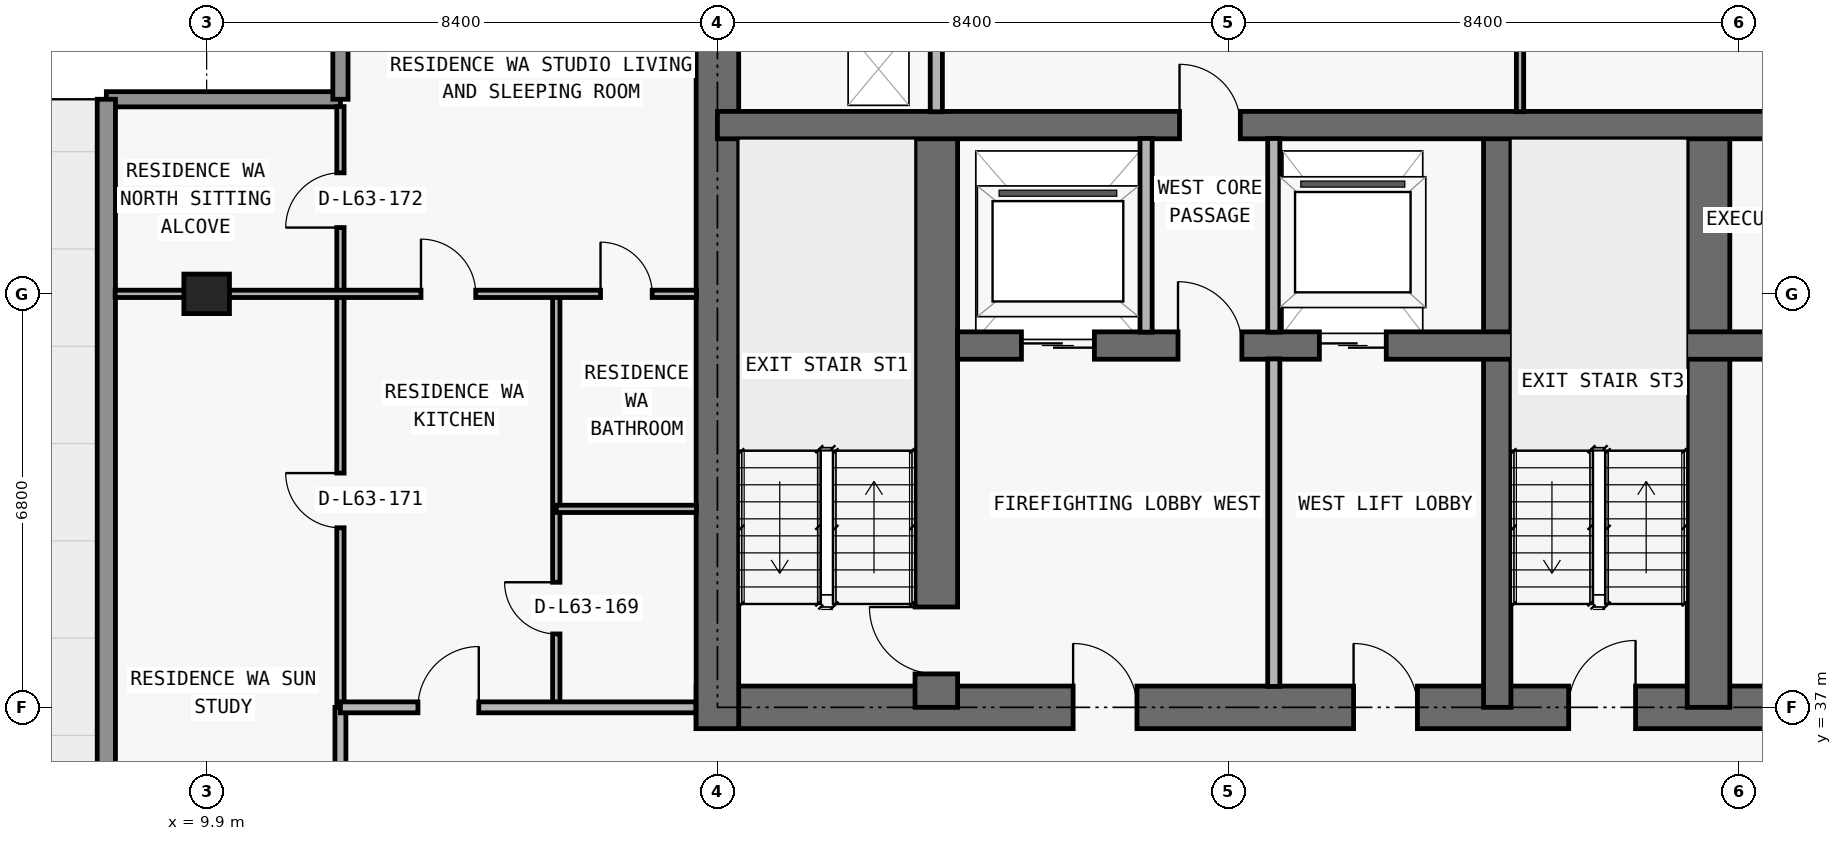
"""IFC4 building model, lengths in metres.
Left out: names, types, materials, properties, quantities, classifications, styles, units other than length and angle.
Written with IfcOpenShell. Run it as: python <this file> out.ifc"""

import sys

from ifc_helpers import new_model, si_unit, direction, frame, frame_2d, origin, origin_2d, place, context, subcontext, project, spatial, rectangle, extrude, element, fill, save


model = new_model("IFC4")
c1 = context("Model", 3, precision=1e-05, world=origin(), true_north=direction((0.0, 1.0)))
c2 = subcontext(c1, "Body", "Model", "MODEL_VIEW")
j1 = project(units=[si_unit("LENGTHUNIT", "METRE"), si_unit("PLANEANGLEUNIT", "RADIAN")], contexts=[c1])
p1 = place(None, origin())
s1 = spatial("IfcSite", under=j1, at=p1, CompositionType="ELEMENT")
p2 = place(p1, origin())
s2 = spatial("IfcBuilding", under=s1, at=p2, CompositionType="ELEMENT")
p3 = place(p2, frame((0.0, 0.0, 226.5)))
s3 = spatial("IfcBuildingStorey", under=s2, at=p3, CompositionType="ELEMENT", Elevation=226.5)
p4 = place(p3, frame((9.9, 43.8, 0.0), z_axis=(0.0, 0.0, 1.0), x_axis=(1.0, 0.0, 0.0)))
e1 = element("IfcColumn", 1, at=p4, inside=s3, PredefinedType="COLUMN", context=c2, shape_type="SweptSolid", body=[
    extrude(rectangle(XDim=0.75, YDim=0.65, at=origin_2d()), origin(), (0.0, 0.0, 1.0), 3.05),
])
p5 = place(p3, frame((17.95, 37.0, 0.0), z_axis=(0.0, 0.0, 1.0), x_axis=(1.0, 0.0, 0.0)))
e2 = element("IfcWall", 2, at=p5, inside=s3, PredefinedType="SHEAR", context=c2, shape_type="SweptSolid", body=[
    extrude(rectangle(XDim=41.9, YDim=0.7, at=frame_2d((20.95, 0.0))), origin(), (0.0, 0.0, 1.0), 3.05),
])
p6 = place(p5, frame((14.35, 0.0, 0.0)))
e3 = element("IfcOpeningElement", 3, at=p6, cuts=e2, PredefinedType="OPENING", context=c2, shape_type="SweptSolid", body=[
    extrude(rectangle(XDim=1.1, YDim=2.15, at=frame_2d((0.55, 1.075))), frame((0.0, 0.36, 0.0), z_axis=(0.0, -1.0, 0.0), x_axis=(1.0, 0.0, 0.0)), (0.0, 0.0, 1.0), 0.72),
])
p7 = place(p5, frame((6.2, 0.0, 0.0)))
e4 = element("IfcOpeningElement", 4, at=p7, cuts=e2, PredefinedType="OPENING", context=c2, shape_type="SweptSolid", body=[
    extrude(rectangle(XDim=1.05, YDim=2.15, at=frame_2d((0.525, 1.075))), frame((0.0, 0.36, 0.0), z_axis=(0.0, -1.0, 0.0), x_axis=(1.0, 0.0, 0.0)), (0.0, 0.0, 1.0), 0.72),
])
p8 = place(p5, frame((34.7, 0.0, 0.0)))
e5 = element("IfcOpeningElement", 5, at=p8, cuts=e2, PredefinedType="OPENING", context=c2, shape_type="SweptSolid", body=[
    extrude(rectangle(XDim=1.05, YDim=2.15, at=frame_2d((0.525, 1.075))), frame((0.0, 0.36, 0.0), z_axis=(0.0, -1.0, 0.0), x_axis=(1.0, 0.0, 0.0)), (0.0, 0.0, 1.0), 0.72),
])
p9 = place(p5, frame((10.812, 0.0, 0.0)))
e6 = element("IfcOpeningElement", 6, at=p9, cuts=e2, PredefinedType="OPENING", context=c2, shape_type="SweptSolid", body=[
    extrude(rectangle(XDim=1.05, YDim=2.15, at=frame_2d((0.525, 1.075))), frame((0.0, 0.36, 0.0), z_axis=(0.0, -1.0, 0.0), x_axis=(1.0, 0.0, 0.0)), (0.0, 0.0, 1.0), 0.72),
])
p10 = place(p5, frame((24.05, 0.0, 0.0)))
e7 = element("IfcOpeningElement", 7, at=p10, cuts=e2, PredefinedType="OPENING", context=c2, shape_type="SweptSolid", body=[
    extrude(rectangle(XDim=1.05, YDim=2.15, at=frame_2d((0.525, 1.075))), frame((0.0, 0.36, 0.0), z_axis=(0.0, -1.0, 0.0), x_axis=(1.0, 0.0, 0.0)), (0.0, 0.0, 1.0), 0.72),
])
p11 = place(p3, frame((18.3, 36.65, 0.0), z_axis=(0.0, 0.0, 1.0), x_axis=(0.0, 1.0, 0.0)))
e8 = element("IfcWall", 8, at=p11, inside=s3, PredefinedType="SHEAR", context=c2, shape_type="SweptSolid", body=[
    extrude(rectangle(XDim=13.95, YDim=0.7, at=frame_2d((6.975, 0.0))), origin(), (0.0, 0.0, 1.0), 3.05),
])
p12 = place(p3, frame((21.9, 37.0, 0.0), z_axis=(0.0, 0.0, 1.0), x_axis=(0.0, 1.0, 0.0)))
e9 = element("IfcWall", 9, at=p12, inside=s3, PredefinedType="SHEAR", context=c2, shape_type="SweptSolid", body=[
    extrude(rectangle(XDim=9.575, YDim=0.7, at=frame_2d((4.788, 0.0))), origin(), (0.0, 0.0, 1.0), 3.05),
])
p13 = place(p12, frame((0.55, 0.0, 0.0)))
e10 = element("IfcOpeningElement", 10, at=p13, cuts=e9, PredefinedType="OPENING", context=c2, shape_type="SweptSolid", body=[
    extrude(rectangle(XDim=1.1, YDim=2.15, at=frame_2d((0.55, 1.075))), frame((0.0, 0.36, 0.0), z_axis=(0.0, -1.0, 0.0), x_axis=(1.0, 0.0, 0.0)), (0.0, 0.0, 1.0), 0.72),
])
p14 = place(p3, frame((31.125, 37.0, 0.0), z_axis=(0.0, 0.0, 1.0), x_axis=(0.0, 1.0, 0.0)))
e11 = element("IfcWall", 11, at=p14, inside=s3, PredefinedType="SHEAR", context=c2, shape_type="SweptSolid", body=[
    extrude(rectangle(XDim=9.575, YDim=0.45, at=frame_2d((4.788, 0.0))), origin(), (0.0, 0.0, 1.0), 3.05),
])
p15 = place(p3, frame((34.6, 37.0, 0.0), z_axis=(0.0, 0.0, 1.0), x_axis=(0.0, 1.0, 0.0)))
e12 = element("IfcWall", 12, at=p15, inside=s3, PredefinedType="SHEAR", context=c2, shape_type="SweptSolid", body=[
    extrude(rectangle(XDim=9.575, YDim=0.7, at=frame_2d((4.788, 0.0))), origin(), (0.0, 0.0, 1.0), 3.05),
])
p16 = place(p3, frame((22.25, 42.95, 0.0), z_axis=(0.0, 0.0, 1.0), x_axis=(1.0, 0.0, 0.0)))
e13 = element("IfcWall", 13, at=p16, inside=s3, PredefinedType="SHEAR", context=c2, shape_type="SweptSolid", body=[
    extrude(rectangle(XDim=33.3, YDim=0.45, at=frame_2d((16.65, 0.0))), origin(), (0.0, 0.0, 1.0), 3.05),
])
p17 = place(p16, frame((1.05, 0.0, 0.0)))
e14 = element("IfcOpeningElement", 14, at=p17, cuts=e13, PredefinedType="OPENING", context=c2, shape_type="SweptSolid", body=[
    extrude(rectangle(XDim=1.2, YDim=2.2, at=frame_2d((0.6, 1.1))), frame((0.0, 0.235, 0.0), z_axis=(0.0, -1.0, 0.0), x_axis=(1.0, 0.0, 0.0)), (0.0, 0.0, 1.0), 0.47),
])
p18 = place(p16, frame((31.05, 0.0, 0.0)))
e15 = element("IfcOpeningElement", 15, at=p18, cuts=e13, PredefinedType="OPENING", context=c2, shape_type="SweptSolid", body=[
    extrude(rectangle(XDim=1.2, YDim=2.2, at=frame_2d((0.6, 1.1))), frame((0.0, 0.235, 0.0), z_axis=(0.0, -1.0, 0.0), x_axis=(1.0, 0.0, 0.0)), (0.0, 0.0, 1.0), 0.47),
])
p19 = place(p16, frame((26.45, 0.0, 0.0)))
e16 = element("IfcOpeningElement", 16, at=p19, cuts=e13, PredefinedType="OPENING", context=c2, shape_type="SweptSolid", body=[
    extrude(rectangle(XDim=1.1, YDim=2.2, at=frame_2d((0.55, 1.1))), frame((0.0, 0.235, 0.0), z_axis=(0.0, -1.0, 0.0), x_axis=(1.0, 0.0, 0.0)), (0.0, 0.0, 1.0), 0.47),
])
p20 = place(p16, frame((5.95, 0.0, 0.0)))
e17 = element("IfcOpeningElement", 17, at=p20, cuts=e13, PredefinedType="OPENING", context=c2, shape_type="SweptSolid", body=[
    extrude(rectangle(XDim=1.1, YDim=2.2, at=frame_2d((0.55, 1.1))), frame((0.0, 0.235, 0.0), z_axis=(0.0, -1.0, 0.0), x_axis=(1.0, 0.0, 0.0)), (0.0, 0.0, 1.0), 0.47),
])
p21 = place(p16, frame((3.625, 0.0, 0.0)))
e18 = element("IfcOpeningElement", 18, at=p21, cuts=e13, PredefinedType="OPENING", context=c2, shape_type="SweptSolid", body=[
    extrude(rectangle(XDim=1.05, YDim=2.15, at=frame_2d((0.525, 1.075))), frame((0.0, 0.235, 0.0), z_axis=(0.0, -1.0, 0.0), x_axis=(1.0, 0.0, 0.0)), (0.0, 0.0, 1.0), 0.47),
])
p22 = place(p16, frame((28.675, 0.0, 0.0)))
e19 = element("IfcOpeningElement", 19, at=p22, cuts=e13, PredefinedType="OPENING", context=c2, shape_type="SweptSolid", body=[
    extrude(rectangle(XDim=1.05, YDim=2.15, at=frame_2d((0.525, 1.075))), frame((0.0, 0.235, 0.0), z_axis=(0.0, -1.0, 0.0), x_axis=(1.0, 0.0, 0.0)), (0.0, 0.0, 1.0), 0.47),
])
p23 = place(p16, frame((14.7, 0.0, 0.0)))
e20 = element("IfcOpeningElement", 20, at=p23, cuts=e13, PredefinedType="OPENING", context=c2, shape_type="SweptSolid", body=[
    extrude(rectangle(XDim=1.0, YDim=2.2, at=frame_2d((0.5, 1.1))), frame((0.0, 0.235, 0.0), z_axis=(0.0, -1.0, 0.0), x_axis=(1.0, 0.0, 0.0)), (0.0, 0.0, 1.0), 0.47),
])
p24 = place(p16, frame((21.45, 0.0, 0.0)))
e21 = element("IfcOpeningElement", 21, at=p24, cuts=e13, PredefinedType="OPENING", context=c2, shape_type="SweptSolid", body=[
    extrude(rectangle(XDim=1.0, YDim=2.2, at=frame_2d((0.5, 1.1))), frame((0.0, 0.235, 0.0), z_axis=(0.0, -1.0, 0.0), x_axis=(1.0, 0.0, 0.0)), (0.0, 0.0, 1.0), 0.47),
])
p25 = place(p3, frame((18.3, 46.575, 0.0), z_axis=(0.0, 0.0, 1.0), x_axis=(1.0, 0.0, 0.0)))
e22 = element("IfcWall", 22, at=p25, inside=s3, PredefinedType="SHEAR", context=c2, shape_type="SweptSolid", body=[
    extrude(rectangle(XDim=41.2, YDim=0.45, at=frame_2d((20.6, 0.0))), origin(), (0.0, 0.0, 1.0), 3.05),
])
p26 = place(p25, frame((7.6, 0.0, 0.0)))
e23 = element("IfcOpeningElement", 23, at=p26, cuts=e22, PredefinedType="OPENING", context=c2, shape_type="SweptSolid", body=[
    extrude(rectangle(XDim=1.0, YDim=2.2, at=frame_2d((0.5, 1.1))), frame((0.0, 0.235, 0.0), z_axis=(0.0, -1.0, 0.0), x_axis=(1.0, 0.0, 0.0)), (0.0, 0.0, 1.0), 0.47),
])
p27 = place(p25, frame((32.625, 0.0, 0.0)))
e24 = element("IfcOpeningElement", 24, at=p27, cuts=e22, PredefinedType="OPENING", context=c2, shape_type="SweptSolid", body=[
    extrude(rectangle(XDim=1.05, YDim=2.15, at=frame_2d((0.525, 1.075))), frame((0.0, 0.235, 0.0), z_axis=(0.0, -1.0, 0.0), x_axis=(1.0, 0.0, 0.0)), (0.0, 0.0, 1.0), 0.47),
])
p28 = place(p3, frame((8.25, 47.0, 0.0), z_axis=(0.0, 0.0, 1.0), x_axis=(1.0, 0.0, 0.0)))
e25 = element("IfcWall", 25, at=p28, inside=s3, PredefinedType="ELEMENTEDWALL", context=c2, shape_type="SweptSolid", body=[
    extrude(rectangle(XDim=3.85, YDim=0.25, at=frame_2d((1.925, 0.0))), origin(), (0.0, 0.0, 1.0), 3.05),
])
p29 = place(p3, frame((12.1, 47.0, 0.0), z_axis=(0.0, 0.0, 1.0), x_axis=(0.0, 1.0, 0.0)))
e26 = element("IfcWall", 26, at=p29, inside=s3, PredefinedType="ELEMENTEDWALL", context=c2, shape_type="SweptSolid", body=[
    extrude(rectangle(XDim=3.45, YDim=0.25, at=frame_2d((1.725, 0.0))), origin(), (0.0, 0.0, 1.0), 3.05),
])
p30 = place(p3, frame((8.25, 30.15, 0.0), z_axis=(0.0, 0.0, 1.0), x_axis=(0.0, 1.0, 0.0)))
e27 = element("IfcWall", 27, at=p30, inside=s3, PredefinedType="STANDARD", context=c2, shape_type="SweptSolid", body=[
    extrude(rectangle(XDim=16.85, YDim=0.3, at=frame_2d((8.425, 0.0))), origin(), (0.0, 0.0, 1.0), 3.05),
])
p31 = place(p3, frame((12.1, 34.505, 0.0), z_axis=(0.0, 0.0, 1.0), x_axis=(0.0, 1.0, 0.0)))
e28 = element("IfcWall", 28, at=p31, inside=s3, PredefinedType="PARTITIONING", context=c2, shape_type="SweptSolid", body=[
    extrude(rectangle(XDim=2.495, YDim=0.18, at=frame_2d((1.248, 0.0))), origin(), (0.0, 0.0, 1.0), 3.05),
])
p32 = place(p3, frame((12.1, 37.005, 0.0), z_axis=(0.0, 0.0, 1.0), x_axis=(0.0, 1.0, 0.0)))
e29 = element("IfcWall", 29, at=p32, inside=s3, PredefinedType="PARTITIONING", context=c2, shape_type="SweptSolid", body=[
    extrude(rectangle(XDim=9.875, YDim=0.12, at=frame_2d((4.938, 0.0))), origin(), (0.0, 0.0, 1.0), 3.05),
])
p33 = place(p32, frame((2.948, 0.0, 0.0)))
e30 = element("IfcOpeningElement", 30, at=p33, cuts=e29, PredefinedType="OPENING", context=c2, shape_type="SweptSolid", body=[
    extrude(rectangle(XDim=0.9, YDim=2.15, at=frame_2d((0.45, 1.075))), frame((0.0, 0.07, 0.0), z_axis=(0.0, -1.0, 0.0), x_axis=(1.0, 0.0, 0.0)), (0.0, 0.0, 1.0), 0.14),
])
p34 = place(p32, frame((7.885, 0.0, 0.0)))
e31 = element("IfcOpeningElement", 31, at=p34, cuts=e29, PredefinedType="OPENING", context=c2, shape_type="SweptSolid", body=[
    extrude(rectangle(XDim=0.9, YDim=2.15, at=frame_2d((0.45, 1.075))), frame((0.0, 0.07, 0.0), z_axis=(0.0, -1.0, 0.0), x_axis=(1.0, 0.0, 0.0)), (0.0, 0.0, 1.0), 0.14),
])
p35 = place(p3, frame((15.65, 37.0, 0.0), z_axis=(0.0, 0.0, 1.0), x_axis=(0.0, 1.0, 0.0)))
e32 = element("IfcWall", 32, at=p35, inside=s3, PredefinedType="PARTITIONING", context=c2, shape_type="SweptSolid", body=[
    extrude(rectangle(XDim=6.8, YDim=0.12, at=frame_2d((3.4, 0.0))), origin(), (0.0, 0.0, 1.0), 3.05),
])
p36 = place(p35, frame((1.207, 0.0, 0.0)))
e33 = element("IfcOpeningElement", 33, at=p36, cuts=e32, PredefinedType="OPENING", context=c2, shape_type="SweptSolid", body=[
    extrude(rectangle(XDim=0.85, YDim=2.1, at=frame_2d((0.425, 1.05))), frame((0.0, 0.07, 0.0), z_axis=(0.0, -1.0, 0.0), x_axis=(1.0, 0.0, 0.0)), (0.0, 0.0, 1.0), 0.14),
])
p37 = place(p3, frame((21.9, 46.795, 0.0), z_axis=(0.0, 0.0, 1.0), x_axis=(0.0, 1.0, 0.0)))
e34 = element("IfcWall", 34, at=p37, inside=s3, PredefinedType="PARTITIONING", context=c2, shape_type="SweptSolid", body=[
    extrude(rectangle(XDim=3.16, YDim=0.2, at=frame_2d((1.58, 0.0))), origin(), (0.0, 0.0, 1.0), 3.05),
])
p38 = place(p3, frame((25.35, 43.17, 0.0), z_axis=(0.0, 0.0, 1.0), x_axis=(0.0, 1.0, 0.0)))
e35 = element("IfcWall", 35, at=p38, inside=s3, PredefinedType="PARTITIONING", context=c2, shape_type="SweptSolid", body=[
    extrude(rectangle(XDim=3.185, YDim=0.2, at=frame_2d((1.593, 0.0))), origin(), (0.0, 0.0, 1.0), 3.05),
])
p39 = place(p3, frame((27.45, 37.345, 0.0), z_axis=(0.0, 0.0, 1.0), x_axis=(0.0, 1.0, 0.0)))
e36 = element("IfcWall", 36, at=p39, inside=s3, PredefinedType="PARTITIONING", context=c2, shape_type="SweptSolid", body=[
    extrude(rectangle(XDim=5.385, YDim=0.2, at=frame_2d((2.692, 0.0))), origin(), (0.0, 0.0, 1.0), 3.05),
])
p40 = place(p3, frame((27.45, 43.17, 0.0), z_axis=(0.0, 0.0, 1.0), x_axis=(0.0, 1.0, 0.0)))
e37 = element("IfcWall", 37, at=p40, inside=s3, PredefinedType="PARTITIONING", context=c2, shape_type="SweptSolid", body=[
    extrude(rectangle(XDim=3.185, YDim=0.2, at=frame_2d((1.593, 0.0))), origin(), (0.0, 0.0, 1.0), 3.05),
])
p41 = place(p3, frame((31.5, 46.795, 0.0), z_axis=(0.0, 0.0, 1.0), x_axis=(0.0, 1.0, 0.0)))
e38 = element("IfcWall", 38, at=p41, inside=s3, PredefinedType="PARTITIONING", context=c2, shape_type="SweptSolid", body=[
    extrude(rectangle(XDim=3.16, YDim=0.12, at=frame_2d((1.58, 0.0))), origin(), (0.0, 0.0, 1.0), 3.05),
])
p42 = place(p3, frame((12.1, 37.0, 0.0), z_axis=(0.0, 0.0, 1.0), x_axis=(1.0, 0.0, 0.0)))
e39 = element("IfcWall", 39, at=p42, inside=s3, PredefinedType="PARTITIONING", context=c2, shape_type="SweptSolid", body=[
    extrude(rectangle(XDim=5.845, YDim=0.18, at=frame_2d((2.922, 0.0))), origin(), (0.0, 0.0, 1.0), 3.05),
])
p43 = place(p42, frame((1.275, 0.0, 0.0)))
e40 = element("IfcOpeningElement", 40, at=p43, cuts=e39, PredefinedType="OPENING", context=c2, shape_type="SweptSolid", body=[
    extrude(rectangle(XDim=1.0, YDim=2.2, at=frame_2d((0.5, 1.1))), frame((0.0, 0.1, 0.0), z_axis=(0.0, -1.0, 0.0), x_axis=(1.0, 0.0, 0.0)), (0.0, 0.0, 1.0), 0.2),
])
p44 = place(p3, frame((15.65, 40.264, 0.0), z_axis=(0.0, 0.0, 1.0), x_axis=(1.0, 0.0, 0.0)))
e41 = element("IfcWall", 41, at=p44, inside=s3, PredefinedType="PARTITIONING", context=c2, shape_type="SweptSolid", body=[
    extrude(rectangle(XDim=2.305, YDim=0.12, at=frame_2d((1.153, 0.0))), origin(), (0.0, 0.0, 1.0), 3.05),
])
p45 = place(p3, frame((8.395, 43.8, 0.0), z_axis=(0.0, 0.0, 1.0), x_axis=(1.0, 0.0, 0.0)))
e42 = element("IfcWall", 42, at=p45, inside=s3, PredefinedType="PARTITIONING", context=c2, shape_type="SweptSolid", body=[
    extrude(rectangle(XDim=9.56, YDim=0.12, at=frame_2d((4.78, 0.0))), origin(), (0.0, 0.0, 1.0), 2.418),
])
p46 = place(p45, frame((5.03, 0.0, 0.0)))
e43 = element("IfcOpeningElement", 43, at=p46, cuts=e42, PredefinedType="OPENING", context=c2, shape_type="SweptSolid", body=[
    extrude(rectangle(XDim=0.9, YDim=2.15, at=frame_2d((0.45, 1.075))), frame((0.0, 0.07, 0.0), z_axis=(0.0, -1.0, 0.0), x_axis=(1.0, 0.0, 0.0)), (0.0, 0.0, 1.0), 0.14),
])
p47 = place(p45, frame((7.982, 0.0, 0.0)))
e44 = element("IfcOpeningElement", 44, at=p47, cuts=e42, PredefinedType="OPENING", context=c2, shape_type="SweptSolid", body=[
    extrude(rectangle(XDim=0.85, YDim=2.1, at=frame_2d((0.425, 1.05))), frame((0.0, 0.07, 0.0), z_axis=(0.0, -1.0, 0.0), x_axis=(1.0, 0.0, 0.0)), (0.0, 0.0, 1.0), 0.14),
])
p48 = place(p17, origin())
e45 = element("IfcDoor", 45, at=p48, inside=s3, OperationType="DOUBLE_DOOR_SLIDING", PredefinedType="DOOR", context=c2, shape_type="SweptSolid", body=[
    extrude(rectangle(XDim=1.2, YDim=2.2, at=frame_2d((0.6, 1.1))), frame((0.0, 0.025, 0.0), z_axis=(0.0, -1.0, 0.0), x_axis=(1.0, 0.0, 0.0)), (0.0, 0.0, 1.0), 0.05),
])
fill(e14, e45)
p49 = place(p20, origin())
e46 = element("IfcDoor", 46, at=p49, inside=s3, OperationType="DOUBLE_DOOR_SLIDING", PredefinedType="DOOR", context=c2, shape_type="SweptSolid", body=[
    extrude(rectangle(XDim=1.1, YDim=2.2, at=frame_2d((0.55, 1.1))), frame((0.0, 0.025, 0.0), z_axis=(0.0, -1.0, 0.0), x_axis=(1.0, 0.0, 0.0)), (0.0, 0.0, 1.0), 0.05),
])
fill(e17, e46)
p50 = place(p6, origin())
e47 = element("IfcDoor", 47, at=p50, inside=s3, OperationType="SINGLE_SWING_RIGHT", PredefinedType="DOOR", context=c2, shape_type="SweptSolid", body=[
    extrude(rectangle(XDim=1.1, YDim=2.15, at=frame_2d((0.55, 1.075))), frame((0.0, 0.025, 0.0), z_axis=(0.0, -1.0, 0.0), x_axis=(1.0, 0.0, 0.0)), (0.0, 0.0, 1.0), 0.05),
])
fill(e3, e47)
p51 = place(p7, origin())
e48 = element("IfcDoor", 48, at=p51, inside=s3, OperationType="SINGLE_SWING_LEFT", PredefinedType="DOOR", context=c2, shape_type="SweptSolid", body=[
    extrude(rectangle(XDim=1.05, YDim=2.15, at=frame_2d((0.525, 1.075))), frame((0.0, 0.025, 0.0), z_axis=(0.0, -1.0, 0.0), x_axis=(1.0, 0.0, 0.0)), (0.0, 0.0, 1.0), 0.05),
])
fill(e4, e48)
p52 = place(p13, origin())
e49 = element("IfcDoor", 49, at=p52, inside=s3, OperationType="SINGLE_SWING_RIGHT", PredefinedType="DOOR", context=c2, shape_type="SweptSolid", body=[
    extrude(rectangle(XDim=1.1, YDim=2.15, at=frame_2d((0.55, 1.075))), frame((0.0, 0.025, 0.0), z_axis=(0.0, -1.0, 0.0), x_axis=(1.0, 0.0, 0.0)), (0.0, 0.0, 1.0), 0.05),
])
fill(e10, e49)
p53 = place(p21, origin())
e50 = element("IfcDoor", 50, at=p53, inside=s3, OperationType="SINGLE_SWING_LEFT", PredefinedType="DOOR", context=c2, shape_type="SweptSolid", body=[
    extrude(rectangle(XDim=1.05, YDim=2.15, at=frame_2d((0.525, 1.075))), frame((0.0, 0.025, 0.0), z_axis=(0.0, -1.0, 0.0), x_axis=(1.0, 0.0, 0.0)), (0.0, 0.0, 1.0), 0.05),
])
fill(e18, e50)
p54 = place(p9, origin())
e51 = element("IfcDoor", 51, at=p54, inside=s3, OperationType="SINGLE_SWING_LEFT", PredefinedType="DOOR", context=c2, shape_type="SweptSolid", body=[
    extrude(rectangle(XDim=1.05, YDim=2.15, at=frame_2d((0.525, 1.075))), frame((0.0, 0.025, 0.0), z_axis=(0.0, -1.0, 0.0), x_axis=(1.0, 0.0, 0.0)), (0.0, 0.0, 1.0), 0.05),
])
fill(e6, e51)
p55 = place(p26, origin())
e52 = element("IfcDoor", 52, at=p55, inside=s3, OperationType="SINGLE_SWING_LEFT", PredefinedType="DOOR", context=c2, shape_type="SweptSolid", body=[
    extrude(rectangle(XDim=1.0, YDim=2.2, at=frame_2d((0.5, 1.1))), frame((0.0, 0.025, 0.0), z_axis=(0.0, -1.0, 0.0), x_axis=(1.0, 0.0, 0.0)), (0.0, 0.0, 1.0), 0.05),
])
fill(e23, e52)
p56 = place(p43, origin())
e53 = element("IfcDoor", 53, at=p56, inside=s3, OperationType="SINGLE_SWING_RIGHT", PredefinedType="DOOR", context=c2, shape_type="SweptSolid", body=[
    extrude(rectangle(XDim=1.0, YDim=2.2, at=frame_2d((0.5, 1.1))), frame((0.0, 0.025, 0.0), z_axis=(0.0, -1.0, 0.0), x_axis=(1.0, 0.0, 0.0)), (0.0, 0.0, 1.0), 0.05),
])
fill(e40, e53)
p57 = place(p46, origin())
e54 = element("IfcDoor", 54, at=p57, inside=s3, OperationType="SINGLE_SWING_LEFT", PredefinedType="DOOR", context=c2, shape_type="SweptSolid", body=[
    extrude(rectangle(XDim=0.9, YDim=2.15, at=frame_2d((0.45, 1.075))), frame((0.0, 0.025, 0.0), z_axis=(0.0, -1.0, 0.0), x_axis=(1.0, 0.0, 0.0)), (0.0, 0.0, 1.0), 0.05),
])
fill(e43, e54)
p58 = place(p36, origin())
e55 = element("IfcDoor", 55, at=p58, inside=s3, OperationType="SINGLE_SWING_RIGHT", PredefinedType="DOOR", context=c2, shape_type="SweptSolid", body=[
    extrude(rectangle(XDim=0.85, YDim=2.1, at=frame_2d((0.425, 1.05))), frame((0.0, 0.025, 0.0), z_axis=(0.0, -1.0, 0.0), x_axis=(1.0, 0.0, 0.0)), (0.0, 0.0, 1.0), 0.05),
])
fill(e33, e55)
p59 = place(p47, origin())
e56 = element("IfcDoor", 56, at=p59, inside=s3, OperationType="SINGLE_SWING_LEFT", PredefinedType="DOOR", context=c2, shape_type="SweptSolid", body=[
    extrude(rectangle(XDim=0.85, YDim=2.1, at=frame_2d((0.425, 1.05))), frame((0.0, 0.025, 0.0), z_axis=(0.0, -1.0, 0.0), x_axis=(1.0, 0.0, 0.0)), (0.0, 0.0, 1.0), 0.05),
])
fill(e44, e56)
p60 = place(p33, origin())
e57 = element("IfcDoor", 57, at=p60, inside=s3, OperationType="SINGLE_SWING_RIGHT", PredefinedType="DOOR", context=c2, shape_type="SweptSolid", body=[
    extrude(rectangle(XDim=0.9, YDim=2.15, at=frame_2d((0.45, 1.075))), frame((0.0, 0.025, 0.0), z_axis=(0.0, -1.0, 0.0), x_axis=(1.0, 0.0, 0.0)), (0.0, 0.0, 1.0), 0.05),
])
fill(e30, e57)
p61 = place(p34, origin())
e58 = element("IfcDoor", 58, at=p61, inside=s3, OperationType="SINGLE_SWING_LEFT", PredefinedType="DOOR", context=c2, shape_type="SweptSolid", body=[
    extrude(rectangle(XDim=0.9, YDim=2.15, at=frame_2d((0.45, 1.075))), frame((0.0, 0.025, 0.0), z_axis=(0.0, -1.0, 0.0), x_axis=(1.0, 0.0, 0.0)), (0.0, 0.0, 1.0), 0.05),
])
fill(e31, e58)
save(model, sys.argv[1])
